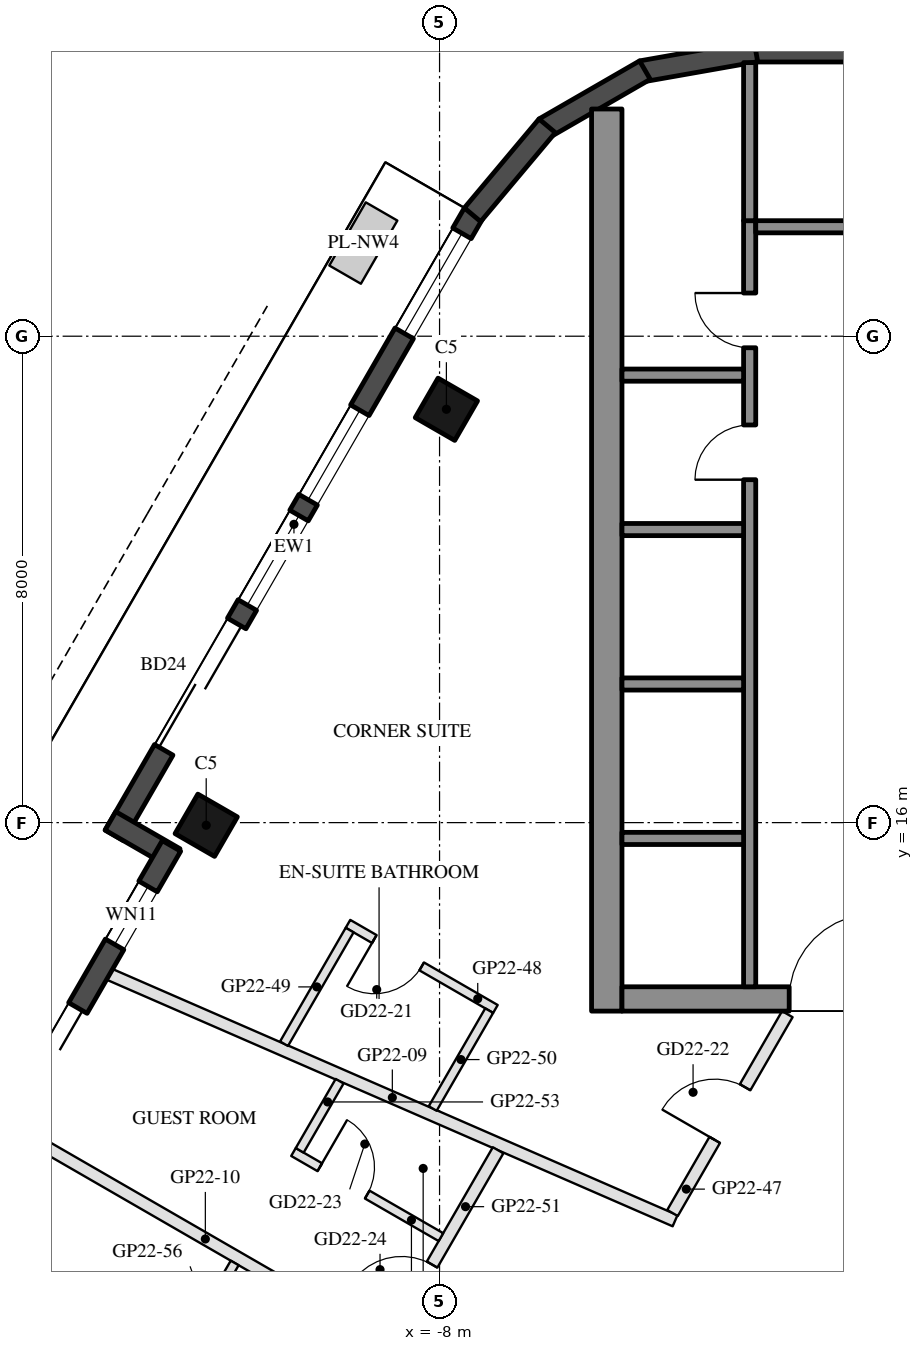
"""IFC4 building model, lengths in metres.
Left out: names, types, materials, properties, quantities, classifications, styles, units other than length and angle.
Written with IfcOpenShell. Run it as: python <this file> out.ifc"""

import sys

from ifc_helpers import new_model, si_unit, direction, frame, frame_2d, origin, origin_2d, place, context, subcontext, project, spatial, rectangle, hollow_rectangle, extrude, element, fill, save


model = new_model("IFC4")
c1 = context("Model", 3, precision=1e-05, world=origin(), true_north=direction((0.0, 1.0)))
c2 = subcontext(c1, "Body", "Model", "MODEL_VIEW")
j1 = project(units=[si_unit("LENGTHUNIT", "METRE"), si_unit("PLANEANGLEUNIT", "RADIAN")], contexts=[c1])
p1 = place(None, origin())
s1 = spatial("IfcSite", under=j1, at=p1, CompositionType="ELEMENT")
p2 = place(p1, origin())
s2 = spatial("IfcBuilding", under=s1, at=p2, CompositionType="ELEMENT")
p3 = place(p2, frame((0.0, 0.0, 228.0)))
s3 = spatial("IfcBuildingStorey", under=s2, at=p3, CompositionType="ELEMENT", Elevation=228.0)
for number, where, z_axis, x_axis in (
    (1, (-7.888, 22.798, 0.0), (0.0, 0.0, 1.0), (0.5, 0.866, 0.0)),
    (2, (-11.838, 15.957, 0.0), (0.0, 0.0, 1.0), (0.5, 0.866, 0.0)),
):
    element("IfcColumn", number, at=place(p3, frame(where, z_axis=z_axis, x_axis=x_axis)), inside=s3, PredefinedType="COLUMN", context=c2, shape_type="SweptSolid", body=[
        extrude(hollow_rectangle(XDim=0.75, YDim=0.75, WallThickness=0.035, at=origin_2d()), origin(), (0.0, 0.0, 1.0), 3.7),
    ])
p4 = place(p3, frame((-7.441, 26.022, 0.0), z_axis=(0.0, 0.0, 1.0), x_axis=(-0.499992533062, -0.86602971478, 0.0)))
e3 = element("IfcWall", 3, at=p4, inside=s3, PredefinedType="SOLIDWALL", context=c2, shape_type="SweptSolid", body=[
    extrude(rectangle(XDim=11.816, YDim=0.35, at=frame_2d((5.908, 0.0))), origin(), (0.0, 0.0, 1.0), 3.45),
])
p5 = place(p4, frame((0.381, 0.0, 0.3)))
e4 = element("IfcOpeningElement", 4, at=p5, cuts=e3, PredefinedType="OPENING", context=c2, shape_type="SweptSolid", body=[
    extrude(rectangle(XDim=1.9, YDim=2.65, at=frame_2d((0.95, 1.325))), frame((0.0, 0.185, 0.0), z_axis=(0.0, -1.0, 0.0), x_axis=(1.0, 0.0, 0.0)), (0.0, 0.0, 1.0), 0.37),
])
p6 = place(p4, frame((7.791, 0.0, 0.0)))
e5 = element("IfcOpeningElement", 5, at=p6, cuts=e3, PredefinedType="OPENING", context=c2, shape_type="SweptSolid", body=[
    extrude(rectangle(XDim=2.4, YDim=2.4, at=frame_2d((1.2, 1.2))), frame((0.0, 0.185, 0.0), z_axis=(0.0, -1.0, 0.0), x_axis=(1.0, 0.0, 0.0)), (0.0, 0.0, 1.0), 0.37),
])
p7 = place(p4, frame((3.741, 0.0, 0.3)))
e6 = element("IfcOpeningElement", 6, at=p7, cuts=e3, PredefinedType="OPENING", context=c2, shape_type="SweptSolid", body=[
    extrude(rectangle(XDim=1.7, YDim=2.65, at=frame_2d((0.85, 1.325))), frame((0.0, 0.185, 0.0), z_axis=(0.0, -1.0, 0.0), x_axis=(1.0, 0.0, 0.0)), (0.0, 0.0, 1.0), 0.37),
])
p8 = place(p4, frame((5.741, 0.0, 0.3)))
e7 = element("IfcOpeningElement", 7, at=p8, cuts=e3, PredefinedType="OPENING", context=c2, shape_type="SweptSolid", body=[
    extrude(rectangle(XDim=1.7, YDim=2.65, at=frame_2d((0.85, 1.325))), frame((0.0, 0.185, 0.0), z_axis=(0.0, -1.0, 0.0), x_axis=(1.0, 0.0, 0.0)), (0.0, 0.0, 1.0), 0.37),
])
p9 = place(p3, frame((-13.413, 16.029, 0.0), z_axis=(0.0, 0.0, 1.0), x_axis=(0.866005645448, -0.500034220881, 0.0)))
e8 = element("IfcWall", 8, at=p9, inside=s3, PredefinedType="SOLIDWALL", context=c2, shape_type="SweptSolid", body=[
    extrude(rectangle(XDim=1.22, YDim=0.35, at=frame_2d((0.61, 0.0))), origin(), (0.0, 0.0, 1.0), 3.45),
])
p10 = place(p3, frame((-12.409, 15.617, 0.0), z_axis=(0.0, 0.0, 1.0), x_axis=(-0.500003597184, -0.866023326939, 0.0)))
e9 = element("IfcWall", 9, at=p10, inside=s3, PredefinedType="SOLIDWALL", context=c2, shape_type="SweptSolid", body=[
    extrude(rectangle(XDim=6.74, YDim=0.35, at=frame_2d((3.37, 0.0))), origin(), (0.0, 0.0, 1.0), 3.45),
])
p11 = place(p10, frame((0.77, 0.0, 0.3)))
e10 = element("IfcOpeningElement", 10, at=p11, cuts=e9, PredefinedType="OPENING", context=c2, shape_type="SweptSolid", body=[
    extrude(rectangle(XDim=1.1, YDim=2.65, at=frame_2d((0.55, 1.325))), frame((0.0, 0.185, 0.0), z_axis=(0.0, -1.0, 0.0), x_axis=(1.0, 0.0, 0.0)), (0.0, 0.0, 1.0), 0.37),
])
p12 = place(p10, frame((3.079, 0.0, 0.0)))
e11 = element("IfcOpeningElement", 11, at=p12, cuts=e9, PredefinedType="OPENING", context=c2, shape_type="SweptSolid", body=[
    extrude(rectangle(XDim=1.5, YDim=2.4, at=frame_2d((0.75, 1.2))), frame((0.0, 0.185, 0.0), z_axis=(0.0, -1.0, 0.0), x_axis=(1.0, 0.0, 0.0)), (0.0, 0.0, 1.0), 0.37),
])
p13 = place(p3, frame((2.829, 28.685, 0.0), z_axis=(0.0, 0.0, 1.0), x_axis=(-1.0, 0.0, 0.0)))
e12 = element("IfcWall", 12, at=p13, inside=s3, PredefinedType="SOLIDWALL", context=c2, shape_type="SweptSolid", body=[
    extrude(rectangle(XDim=5.658, YDim=0.35, at=frame_2d((2.829, 0.0))), origin(), (0.0, 0.0, 1.0), 3.45),
])
for number, where, z_axis, x_axis in (
    (13, (-2.799, 28.688, 0.0), (0.0, 0.0, 1.0), (-0.985, -0.174, 0.0)),
    (14, (-4.623, 28.377, 0.0), (0.0, 0.0, 1.0), (-0.866, -0.5, 0.0)),
):
    element("IfcWall", number, at=place(p3, frame(where, z_axis=z_axis, x_axis=x_axis)), inside=s3, PredefinedType="SOLIDWALL", context=c2, shape_type="SweptSolid", body=[
        extrude(rectangle(XDim=1.91, YDim=0.35, at=frame_2d((0.955, 0.0))), origin(), (0.0, 0.0, 1.0), 3.45),
    ])
p14 = place(p3, frame((-6.23, 27.461, 0.0), z_axis=(0.0, 0.0, 1.0), x_axis=(-0.642808304945, -0.766027077259, 0.0)))
e15 = element("IfcWall", 15, at=p14, inside=s3, PredefinedType="SOLIDWALL", context=c2, shape_type="SweptSolid", body=[
    extrude(rectangle(XDim=1.91, YDim=0.35, at=frame_2d((0.955, 0.0))), origin(), (0.0, 0.0, 1.0), 3.45),
])
p15 = place(p3, frame((-5.25, 12.9, 0.0), z_axis=(0.0, 0.0, 1.0), x_axis=(0.0, 1.0, 0.0)))
e16 = element("IfcWall", 16, at=p15, inside=s3, PredefinedType="SHEAR", context=c2, shape_type="SweptSolid", body=[
    extrude(rectangle(XDim=14.837, YDim=0.5, at=frame_2d((7.418, 0.0))), origin(), (0.0, 0.0, 1.0), 3.45),
])
p16 = place(p3, frame((5.0, 13.1, 0.0), z_axis=(0.0, 0.0, 1.0), x_axis=(-1.0, 0.0, 0.0)))
e17 = element("IfcWall", 17, at=p16, inside=s3, PredefinedType="SHEAR", context=c2, shape_type="SweptSolid", body=[
    extrude(rectangle(XDim=10.0, YDim=0.4, at=frame_2d((5.0, 0.0))), origin(), (0.0, 0.0, 1.0), 3.45),
])
p17 = place(p16, frame((3.55, 0.0, 0.0)))
e18 = element("IfcOpeningElement", 18, at=p17, cuts=e17, PredefinedType="OPENING", context=c2, shape_type="SweptSolid", body=[
    extrude(rectangle(XDim=1.1, YDim=2.1, at=frame_2d((0.55, 1.05))), frame((0.0, 0.21, 0.0), z_axis=(0.0, -1.0, 0.0), x_axis=(1.0, 0.0, 0.0)), (0.0, 0.0, 1.0), 0.42),
])
p18 = place(p16, frame((5.85, 0.0, 0.0)))
e19 = element("IfcOpeningElement", 19, at=p18, cuts=e17, PredefinedType="OPENING", context=c2, shape_type="SweptSolid", body=[
    extrude(rectangle(XDim=1.4, YDim=2.1, at=frame_2d((0.7, 1.05))), frame((0.0, 0.21, 0.0), z_axis=(0.0, -1.0, 0.0), x_axis=(1.0, 0.0, 0.0)), (0.0, 0.0, 1.0), 0.42),
])
p19 = place(p3, frame((-2.9, 13.3, 0.0), z_axis=(0.0, 0.0, 1.0), x_axis=(0.0, 1.0, 0.0)))
e20 = element("IfcWall", 20, at=p19, inside=s3, PredefinedType="SHEAR", context=c2, shape_type="SweptSolid", body=[
    extrude(rectangle(XDim=12.6, YDim=0.2, at=frame_2d((6.3, 0.0))), origin(), (0.0, 0.0, 1.0), 3.45),
])
p20 = place(p19, frame((8.34, 0.0, 0.0)))
e21 = element("IfcOpeningElement", 21, at=p20, cuts=e20, PredefinedType="OPENING", context=c2, shape_type="SweptSolid", body=[
    extrude(rectangle(XDim=0.9, YDim=2.1, at=frame_2d((0.45, 1.05))), frame((0.0, 0.11, 0.0), z_axis=(0.0, -1.0, 0.0), x_axis=(1.0, 0.0, 0.0)), (0.0, 0.0, 1.0), 0.22),
])
p21 = place(p19, frame((10.51, 0.0, 0.0)))
e22 = element("IfcOpeningElement", 22, at=p21, cuts=e20, PredefinedType="OPENING", context=c2, shape_type="SweptSolid", body=[
    extrude(rectangle(XDim=0.9, YDim=2.1, at=frame_2d((0.45, 1.05))), frame((0.0, 0.11, 0.0), z_axis=(0.0, -1.0, 0.0), x_axis=(1.0, 0.0, 0.0)), (0.0, 0.0, 1.0), 0.22),
])
p22 = place(p3, frame((-0.4, 25.8, 0.0), z_axis=(0.0, 0.0, 1.0), x_axis=(-1.0, 0.0, 0.0)))
e23 = element("IfcWall", 23, at=p22, inside=s3, PredefinedType="SHEAR", context=c2, shape_type="SweptSolid", body=[
    extrude(rectangle(XDim=2.4, YDim=0.2, at=frame_2d((1.2, 0.0))), origin(), (0.0, 0.0, 1.0), 3.45),
])
for number, where, z_axis, x_axis in (
    (24, (-3.0, 15.74, 0.0), (0.0, 0.0, 1.0), (-1.0, 0.0, 0.0)),
    (25, (-3.0, 18.28, 0.0), (0.0, 0.0, 1.0), (-1.0, 0.0, 0.0)),
    (26, (-3.0, 20.82, 0.0), (0.0, 0.0, 1.0), (-1.0, 0.0, 0.0)),
    (27, (-3.0, 23.36, 0.0), (0.0, 0.0, 1.0), (-1.0, 0.0, 0.0)),
):
    element("IfcWall", number, at=place(p3, frame(where, z_axis=z_axis, x_axis=x_axis)), inside=s3, PredefinedType="SHEAR", context=c2, shape_type="SweptSolid", body=[
        extrude(rectangle(XDim=2.0, YDim=0.2, at=frame_2d((1.0, 0.0))), origin(), (0.0, 0.0, 1.0), 3.45),
    ])
p23 = place(p3, frame((-2.9, 25.9, 0.0), z_axis=(0.0, 0.0, 1.0), x_axis=(0.0, 1.0, 0.0)))
e28 = element("IfcWall", 28, at=p23, inside=s3, PredefinedType="SHEAR", context=c2, shape_type="SweptSolid", body=[
    extrude(rectangle(XDim=2.6, YDim=0.2, at=frame_2d((1.3, 0.0))), origin(), (0.0, 0.0, 1.0), 3.45),
])
p24 = place(p3, frame((-13.427, 13.504, 0.0), z_axis=(0.0, 0.0, 1.0), x_axis=(0.916759471343, -0.399439697204, 0.0)))
e29 = element("IfcWall", 29, at=p24, inside=s3, PredefinedType="PARTITIONING", context=c2, shape_type="SweptSolid", body=[
    extrude(rectangle(XDim=10.144, YDim=0.2, at=frame_2d((5.072, 0.0))), origin(), (0.0, 0.0, 1.0), 2.96),
])
p25 = place(p3, frame((-14.917, 10.922, 0.0), z_axis=(0.0, 0.0, 1.0), x_axis=(0.866019052629, -0.500011000363, 0.0)))
e30 = element("IfcWall", 30, at=p25, inside=s3, PredefinedType="PARTITIONING", context=c2, shape_type="SweptSolid", body=[
    extrude(rectangle(XDim=7.08, YDim=0.2, at=frame_2d((3.54, 0.0))), origin(), (0.0, 0.0, 1.0), 2.96),
])
p26 = place(p3, frame((-4.169, 9.58, 0.0), z_axis=(0.0, 0.0, 1.0), x_axis=(0.499991068497, 0.866030560329, 0.0)))
e31 = element("IfcWall", 31, at=p26, inside=s3, PredefinedType="PARTITIONING", context=c2, shape_type="SweptSolid", body=[
    extrude(rectangle(XDim=3.776, YDim=0.2, at=frame_2d((1.888, 0.0))), origin(), (0.0, 0.0, 1.0), 2.76),
])
p27 = place(p26, frame((1.388, 0.0, 0.0)))
e32 = element("IfcOpeningElement", 32, at=p27, cuts=e31, PredefinedType="OPENING", context=c2, shape_type="SweptSolid", body=[
    extrude(rectangle(XDim=1.0, YDim=2.1, at=frame_2d((0.5, 1.05))), frame((0.0, 0.11, 0.0), z_axis=(0.0, -1.0, 0.0), x_axis=(1.0, 0.0, 0.0)), (0.0, 0.0, 1.0), 0.22),
])
p28 = place(p3, frame((-7.081, 12.935, 0.0), z_axis=(0.0, 0.0, 1.0), x_axis=(-0.866056369097, 0.49994636267, 0.0)))
e33 = element("IfcWall", 33, at=p28, inside=s3, PredefinedType="PARTITIONING", context=c2, shape_type="SweptSolid", body=[
    extrude(rectangle(XDim=2.8, YDim=0.15, at=frame_2d((1.4, 0.0))), origin(), (0.0, 0.0, 1.0), 3.45),
])
p29 = place(p28, frame((1.4, 0.0, 0.0)))
e34 = element("IfcOpeningElement", 34, at=p29, cuts=e33, PredefinedType="OPENING", context=c2, shape_type="SweptSolid", body=[
    extrude(rectangle(XDim=0.9, YDim=2.1, at=frame_2d((0.45, 1.05))), frame((0.0, 0.085, 0.0), z_axis=(0.0, -1.0, 0.0), x_axis=(1.0, 0.0, 0.0)), (0.0, 0.0, 1.0), 0.17),
])
p30 = place(p3, frame((-9.479, 14.233, 0.0), z_axis=(0.0, 0.0, 1.0), x_axis=(-0.499983569942, -0.866034889475, 0.0)))
e35 = element("IfcWall", 35, at=p30, inside=s3, PredefinedType="PARTITIONING", context=c2, shape_type="SweptSolid", body=[
    extrude(rectangle(XDim=2.158, YDim=0.15, at=frame_2d((1.079, 0.0))), origin(), (0.0, 0.0, 1.0), 3.45),
])
p31 = place(p3, frame((-7.184, 12.908, 0.0), z_axis=(0.0, 0.0, 1.0), x_axis=(-0.49995366312, -0.866052154742, 0.0)))
e36 = element("IfcWall", 36, at=p31, inside=s3, PredefinedType="PARTITIONING", context=c2, shape_type="SweptSolid", body=[
    extrude(rectangle(XDim=1.859, YDim=0.15, at=frame_2d((0.929, 0.0))), origin(), (0.0, 0.0, 1.0), 3.45),
])
p32 = place(p3, frame((-8.823, 7.519, 0.0), z_axis=(0.0, 0.0, 1.0), x_axis=(0.500036104519, 0.866004557827, 0.0)))
e37 = element("IfcWall", 37, at=p32, inside=s3, PredefinedType="PARTITIONING", context=c2, shape_type="SweptSolid", body=[
    extrude(rectangle(XDim=3.571, YDim=0.2, at=frame_2d((1.786, 0.0))), origin(), (0.0, 0.0, 1.0), 2.76),
])
p33 = place(p32, frame((0.4, 0.0, 0.0)))
e38 = element("IfcOpeningElement", 38, at=p33, cuts=e37, PredefinedType="OPENING", context=c2, shape_type="SweptSolid", body=[
    extrude(rectangle(XDim=1.0, YDim=2.1, at=frame_2d((0.5, 1.05))), frame((0.0, 0.11, 0.0), z_axis=(0.0, -1.0, 0.0), x_axis=(1.0, 0.0, 0.0)), (0.0, 0.0, 1.0), 0.22),
])
p34 = place(p3, frame((-10.402, 10.583, 0.0), z_axis=(0.0, 0.0, 1.0), x_axis=(0.866034573852, -0.49998411664, 0.0)))
e39 = element("IfcWall", 39, at=p34, inside=s3, PredefinedType="PARTITIONING", context=c2, shape_type="SweptSolid", body=[
    extrude(rectangle(XDim=2.8, YDim=0.15, at=frame_2d((1.4, 0.0))), origin(), (0.0, 0.0, 1.0), 2.76),
])
p35 = place(p34, frame((0.5, 0.0, 0.0)))
e40 = element("IfcOpeningElement", 40, at=p35, cuts=e39, PredefinedType="OPENING", context=c2, shape_type="SweptSolid", body=[
    extrude(rectangle(XDim=0.9, YDim=2.1, at=frame_2d((0.45, 1.05))), frame((0.0, 0.085, 0.0), z_axis=(0.0, -1.0, 0.0), x_axis=(1.0, 0.0, 0.0)), (0.0, 0.0, 1.0), 0.17),
])
p36 = place(p3, frame((-9.644, 11.747, 0.0), z_axis=(0.0, 0.0, 1.0), x_axis=(-0.499899541988, -0.866083395476, 0.0)))
e41 = element("IfcWall", 41, at=p36, inside=s3, PredefinedType="PARTITIONING", context=c2, shape_type="SweptSolid", body=[
    extrude(rectangle(XDim=1.313, YDim=0.15, at=frame_2d((0.656, 0.0))), origin(), (0.0, 0.0, 1.0), 2.76),
])
p37 = place(p3, frame((-11.369, 8.758, 0.0), z_axis=(0.0, 0.0, 1.0), x_axis=(-0.500042316284, -0.866000971088, 0.0)))
e42 = element("IfcWall", 42, at=p37, inside=s3, PredefinedType="PARTITIONING", context=c2, shape_type="SweptSolid", body=[
    extrude(rectangle(XDim=1.85, YDim=0.15, at=frame_2d((0.925, 0.0))), origin(), (0.0, 0.0, 1.0), 2.76),
])
p38 = place(p5, origin())
e43 = element("IfcWindow", 43, at=p38, inside=s3, PartitioningType="SINGLE_PANEL", PredefinedType="WINDOW", context=c2, shape_type="SweptSolid", body=[
    extrude(rectangle(XDim=1.9, YDim=2.65, at=frame_2d((0.95, 1.325))), frame((0.0, 0.03, 0.0), z_axis=(0.0, -1.0, 0.0), x_axis=(1.0, 0.0, 0.0)), (0.0, 0.0, 1.0), 0.06),
])
fill(e4, e43)
p39 = place(p6, frame((2.4, 0.0, 0.0), z_axis=(0.0, 0.0, 1.0), x_axis=(-1.0, 0.0, 0.0)))
e44 = element("IfcDoor", 44, at=p39, inside=s3, OperationType="SLIDING_TO_LEFT", PredefinedType="DOOR", context=c2, shape_type="SweptSolid", body=[
    extrude(rectangle(XDim=2.4, YDim=2.4, at=frame_2d((1.2, 1.2))), frame((0.0, 0.025, 0.0), z_axis=(0.0, -1.0, 0.0), x_axis=(1.0, 0.0, 0.0)), (0.0, 0.0, 1.0), 0.05),
])
fill(e5, e44)
p40 = place(p7, origin())
e45 = element("IfcWindow", 45, at=p40, inside=s3, PartitioningType="SINGLE_PANEL", PredefinedType="WINDOW", context=c2, shape_type="SweptSolid", body=[
    extrude(rectangle(XDim=1.7, YDim=2.65, at=frame_2d((0.85, 1.325))), frame((0.0, 0.03, 0.0), z_axis=(0.0, -1.0, 0.0), x_axis=(1.0, 0.0, 0.0)), (0.0, 0.0, 1.0), 0.06),
])
fill(e6, e45)
p41 = place(p8, origin())
e46 = element("IfcWindow", 46, at=p41, inside=s3, PartitioningType="SINGLE_PANEL", PredefinedType="WINDOW", context=c2, shape_type="SweptSolid", body=[
    extrude(rectangle(XDim=1.7, YDim=2.65, at=frame_2d((0.85, 1.325))), frame((0.0, 0.03, 0.0), z_axis=(0.0, -1.0, 0.0), x_axis=(1.0, 0.0, 0.0)), (0.0, 0.0, 1.0), 0.06),
])
fill(e7, e46)
p42 = place(p11, origin())
e47 = element("IfcWindow", 47, at=p42, inside=s3, PartitioningType="SINGLE_PANEL", PredefinedType="WINDOW", context=c2, shape_type="SweptSolid", body=[
    extrude(rectangle(XDim=1.1, YDim=2.65, at=frame_2d((0.55, 1.325))), frame((0.0, 0.03, 0.0), z_axis=(0.0, -1.0, 0.0), x_axis=(1.0, 0.0, 0.0)), (0.0, 0.0, 1.0), 0.06),
])
fill(e10, e47)
p43 = place(p12, frame((1.5, 0.0, 0.0), z_axis=(0.0, 0.0, 1.0), x_axis=(-1.0, 0.0, 0.0)))
e48 = element("IfcDoor", 48, at=p43, inside=s3, OperationType="SLIDING_TO_LEFT", PredefinedType="DOOR", context=c2, shape_type="SweptSolid", body=[
    extrude(rectangle(XDim=1.5, YDim=2.4, at=frame_2d((0.75, 1.2))), frame((0.0, 0.025, 0.0), z_axis=(0.0, -1.0, 0.0), x_axis=(1.0, 0.0, 0.0)), (0.0, 0.0, 1.0), 0.05),
])
fill(e11, e48)
p44 = place(p20, origin())
e49 = element("IfcDoor", 49, at=p44, inside=s3, OperationType="SINGLE_SWING_LEFT", PredefinedType="DOOR", context=c2, shape_type="SweptSolid", body=[
    extrude(rectangle(XDim=0.9, YDim=2.1, at=frame_2d((0.45, 1.05))), frame((0.0, 0.025, 0.0), z_axis=(0.0, -1.0, 0.0), x_axis=(1.0, 0.0, 0.0)), (0.0, 0.0, 1.0), 0.05),
])
fill(e21, e49)
p45 = place(p21, origin())
e50 = element("IfcDoor", 50, at=p45, inside=s3, OperationType="SINGLE_SWING_RIGHT", PredefinedType="DOOR", context=c2, shape_type="SweptSolid", body=[
    extrude(rectangle(XDim=0.9, YDim=2.1, at=frame_2d((0.45, 1.05))), frame((0.0, 0.025, 0.0), z_axis=(0.0, -1.0, 0.0), x_axis=(1.0, 0.0, 0.0)), (0.0, 0.0, 1.0), 0.05),
])
fill(e22, e50)
p46 = place(p18, frame((1.4, 0.0, 0.0), z_axis=(0.0, 0.0, 1.0), x_axis=(-1.0, 0.0, 0.0)))
e51 = element("IfcDoor", 51, at=p46, inside=s3, OperationType="DOUBLE_DOOR_SINGLE_SWING", PredefinedType="DOOR", context=c2, shape_type="SweptSolid", body=[
    extrude(rectangle(XDim=1.4, YDim=2.1, at=frame_2d((0.7, 1.05))), frame((0.0, 0.025, 0.0), z_axis=(0.0, -1.0, 0.0), x_axis=(1.0, 0.0, 0.0)), (0.0, 0.0, 1.0), 0.05),
])
fill(e19, e51)
p47 = place(p29, origin())
e52 = element("IfcDoor", 52, at=p47, inside=s3, OperationType="SINGLE_SWING_RIGHT", PredefinedType="DOOR", context=c2, shape_type="SweptSolid", body=[
    extrude(rectangle(XDim=0.9, YDim=2.1, at=frame_2d((0.45, 1.05))), frame((0.0, 0.025, 0.0), z_axis=(0.0, -1.0, 0.0), x_axis=(1.0, 0.0, 0.0)), (0.0, 0.0, 1.0), 0.05),
])
fill(e34, e52)
p48 = place(p27, origin())
e53 = element("IfcDoor", 53, at=p48, inside=s3, OperationType="SINGLE_SWING_LEFT", PredefinedType="DOOR", context=c2, shape_type="SweptSolid", body=[
    extrude(rectangle(XDim=1.0, YDim=2.1, at=frame_2d((0.5, 1.05))), frame((0.0, 0.025, 0.0), z_axis=(0.0, -1.0, 0.0), x_axis=(1.0, 0.0, 0.0)), (0.0, 0.0, 1.0), 0.05),
])
fill(e32, e53)
p49 = place(p35, origin())
e54 = element("IfcDoor", 54, at=p49, inside=s3, OperationType="SINGLE_SWING_LEFT", PredefinedType="DOOR", context=c2, shape_type="SweptSolid", body=[
    extrude(rectangle(XDim=0.9, YDim=2.1, at=frame_2d((0.45, 1.05))), frame((0.0, 0.025, 0.0), z_axis=(0.0, -1.0, 0.0), x_axis=(1.0, 0.0, 0.0)), (0.0, 0.0, 1.0), 0.05),
])
fill(e40, e54)
p50 = place(p33, origin())
e55 = element("IfcDoor", 55, at=p50, inside=s3, OperationType="SINGLE_SWING_LEFT", PredefinedType="DOOR", context=c2, shape_type="SweptSolid", body=[
    extrude(rectangle(XDim=1.0, YDim=2.1, at=frame_2d((0.5, 1.05))), frame((0.0, 0.025, 0.0), z_axis=(0.0, -1.0, 0.0), x_axis=(1.0, 0.0, 0.0)), (0.0, 0.0, 1.0), 0.05),
])
fill(e38, e55)
save(model, sys.argv[1])
